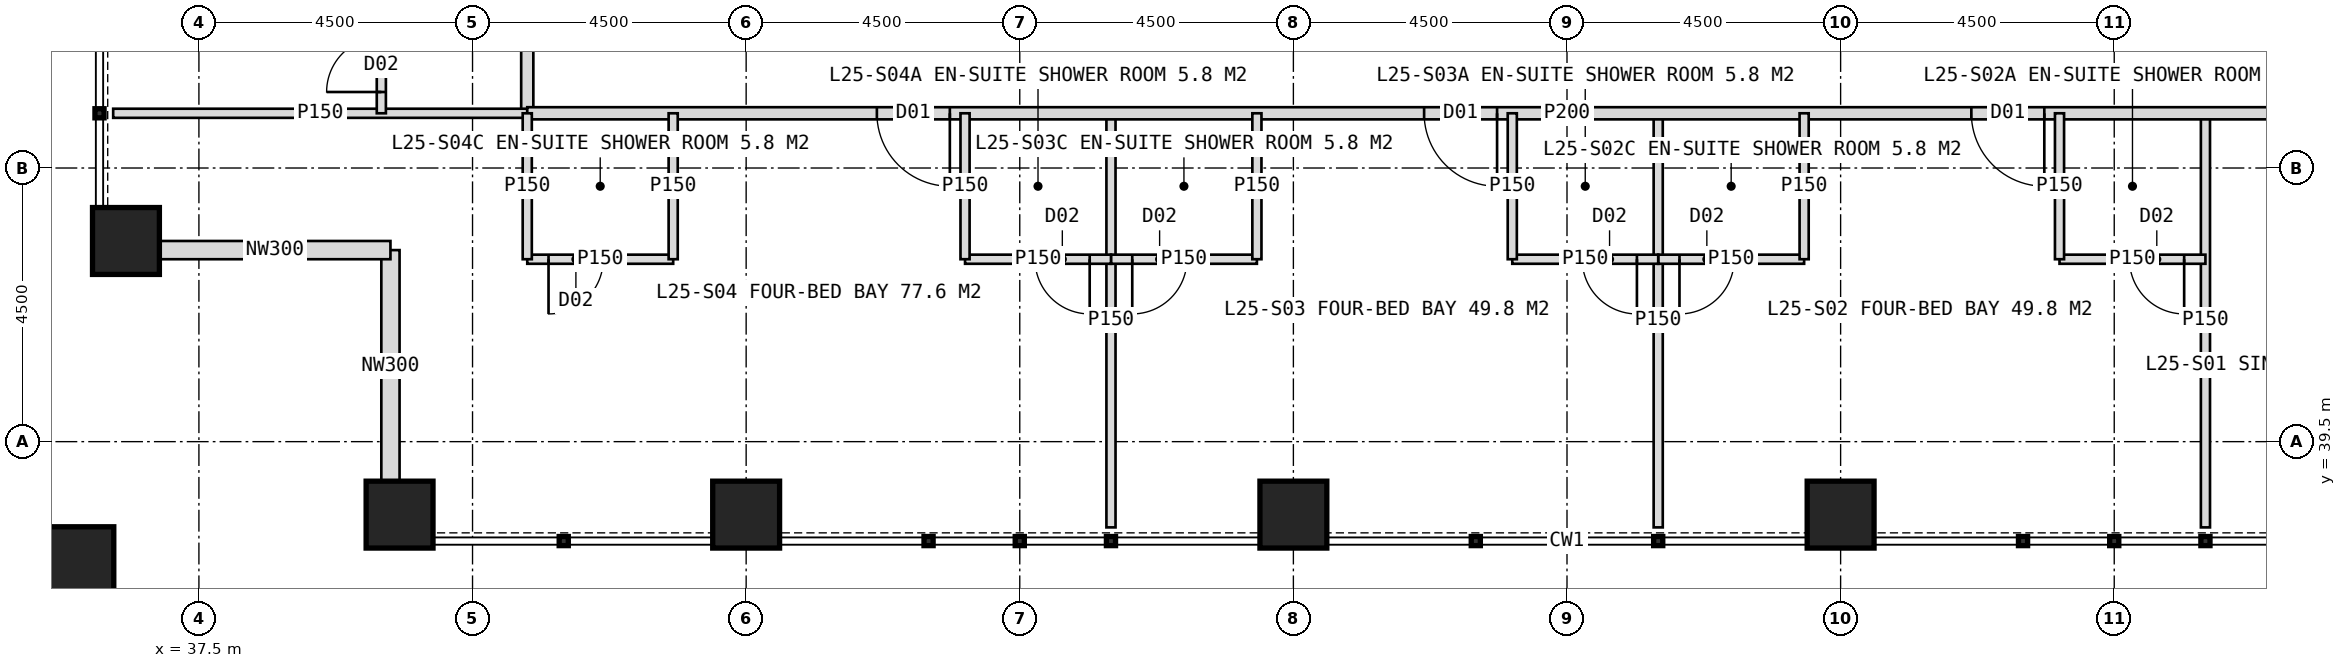
"""IFC4 building model, lengths in metres.
Left out: names, types, materials, properties, quantities, classifications, styles, units other than length and angle.
Written with IfcOpenShell. Run it as: python <this file> out.ifc"""

import sys

from ifc_helpers import new_model, si_unit, direction, frame, frame_2d, origin, origin_2d, place, context, subcontext, project, spatial, rectangle, hollow_rectangle, extrude, element, fill, save


model = new_model("IFC4")
c1 = context("Model", 3, precision=1e-05, world=origin(), true_north=direction((0.0, 1.0)))
c2 = subcontext(c1, "Body", "Model", "MODEL_VIEW")
j1 = project(units=[si_unit("LENGTHUNIT", "METRE"), si_unit("PLANEANGLEUNIT", "RADIAN")], contexts=[c1])
p1 = place(None, origin())
s1 = spatial("IfcSite", under=j1, at=p1, CompositionType="ELEMENT")
p2 = place(p1, origin())
s2 = spatial("IfcBuilding", under=s1, at=p2, CompositionType="ELEMENT")
p3 = place(p2, frame((0.0, 0.0, 108.0)))
s3 = spatial("IfcBuildingStorey", under=s2, at=p3, CompositionType="ELEMENT", Elevation=108.0)
for number, where, z_axis, x_axis in (
    (1, (40.8, 38.3, 0.0), (0.0, 0.0, 1.0), (1.0, 0.0, 0.0)),
    (2, (36.3, 42.8, 0.0), (0.0, 0.0, 1.0), (1.0, 0.0, 0.0)),
    (3, (46.5, 38.3, 0.0), (0.0, 0.0, 1.0), (1.0, 0.0, 0.0)),
    (4, (55.5, 38.3, 0.0), (0.0, 0.0, 1.0), (1.0, 0.0, 0.0)),
    (5, (64.5, 38.3, 0.0), (0.0, 0.0, 1.0), (1.0, 0.0, 0.0)),
):
    element("IfcColumn", number, at=place(p3, frame(where, z_axis=z_axis, x_axis=x_axis)), inside=s3, PredefinedType="COLUMN", context=c2, shape_type="SweptSolid", body=[
        extrude(hollow_rectangle(XDim=1.1, YDim=1.1, WallThickness=0.1, at=origin_2d()), origin(), (0.0, 0.0, 1.0), 4.0),
    ])
p4 = place(p3, frame((35.4, 37.4, 0.0), z_axis=(0.0, 0.0, 1.0), x_axis=(1.0, 0.0, 0.0)))
e6 = element("IfcColumn", 6, at=p4, inside=s3, PredefinedType="COLUMN", context=c2, shape_type="SweptSolid", body=[
    extrude(hollow_rectangle(XDim=1.4, YDim=1.4, WallThickness=0.08, at=origin_2d()), origin(), (0.0, 0.0, 1.0), 4.0),
])
for number, where, z_axis, x_axis in (
    (7, (40.65, 38.85, 0.0), (0.0, 0.0, 1.0), (0.0, 1.0, 0.0)),
    (8, (40.65, 42.65, 0.0), (0.0, 0.0, 1.0), (-1.0, 0.0, 0.0)),
):
    element("IfcWall", number, at=place(p3, frame(where, z_axis=z_axis, x_axis=x_axis)), inside=s3, PredefinedType="ELEMENTEDWALL", context=c2, shape_type="SweptSolid", body=[
        extrude(rectangle(XDim=3.8, YDim=0.3, at=frame_2d((1.9, 0.0))), origin(), (0.0, 0.0, 1.0), 4.0),
    ])
p5 = place(p3, frame((42.9, 44.9, 0.0), z_axis=(0.0, 0.0, 1.0), x_axis=(0.0, 1.0, 0.0)))
e9 = element("IfcWall", 9, at=p5, inside=s3, PredefinedType="PARTITIONING", context=c2, shape_type="SweptSolid", body=[
    extrude(rectangle(XDim=34.2, YDim=0.2, at=frame_2d((17.1, 0.0))), origin(), (0.0, 0.0, 1.0), 3.75),
])
p6 = place(p5, frame((3.25, 0.0, 0.0)))
e10 = element("IfcOpeningElement", 10, at=p6, cuts=e9, PredefinedType="OPENING", context=c2, shape_type="SweptSolid", body=[
    extrude(rectangle(XDim=1.2, YDim=2.2, at=frame_2d((0.6, 1.1))), frame((0.0, 0.11, 0.0), z_axis=(0.0, -1.0, 0.0), x_axis=(1.0, 0.0, 0.0)), (0.0, 0.0, 1.0), 0.22),
])
p7 = place(p5, frame((10.75, 0.0, 0.0)))
e11 = element("IfcOpeningElement", 11, at=p7, cuts=e9, PredefinedType="OPENING", context=c2, shape_type="SweptSolid", body=[
    extrude(rectangle(XDim=1.2, YDim=2.2, at=frame_2d((0.6, 1.1))), frame((0.0, 0.11, 0.0), z_axis=(0.0, -1.0, 0.0), x_axis=(1.0, 0.0, 0.0)), (0.0, 0.0, 1.0), 0.22),
])
p8 = place(p5, frame((19.75, 0.0, 0.0)))
e12 = element("IfcOpeningElement", 12, at=p8, cuts=e9, PredefinedType="OPENING", context=c2, shape_type="SweptSolid", body=[
    extrude(rectangle(XDim=1.2, YDim=2.2, at=frame_2d((0.6, 1.1))), frame((0.0, 0.11, 0.0), z_axis=(0.0, -1.0, 0.0), x_axis=(1.0, 0.0, 0.0)), (0.0, 0.0, 1.0), 0.22),
])
p9 = place(p5, frame((28.75, 0.0, 0.0)))
e13 = element("IfcOpeningElement", 13, at=p9, cuts=e9, PredefinedType="OPENING", context=c2, shape_type="SweptSolid", body=[
    extrude(rectangle(XDim=1.2, YDim=2.2, at=frame_2d((0.6, 1.1))), frame((0.0, 0.11, 0.0), z_axis=(0.0, -1.0, 0.0), x_axis=(1.0, 0.0, 0.0)), (0.0, 0.0, 1.0), 0.22),
])
p10 = place(p3, frame((42.9, 44.9, 0.0), z_axis=(0.0, 0.0, 1.0), x_axis=(-1.0, 0.0, 0.0)))
e14 = element("IfcWall", 14, at=p10, inside=s3, PredefinedType="PARTITIONING", context=c2, shape_type="SweptSolid", body=[
    extrude(rectangle(XDim=6.81, YDim=0.15, at=frame_2d((3.405, 0.0))), origin(), (0.0, 0.0, 1.0), 3.75),
])
p11 = place(p3, frame((40.5, 44.9, 0.0), z_axis=(0.0, 0.0, 1.0), x_axis=(0.0, 1.0, 0.0)))
e15 = element("IfcWall", 15, at=p11, inside=s3, PredefinedType="PARTITIONING", context=c2, shape_type="SweptSolid", body=[
    extrude(rectangle(XDim=3.0, YDim=0.15, at=frame_2d((1.5, 0.0))), origin(), (0.0, 0.0, 1.0), 3.75),
])
p12 = place(p11, frame((0.35, 0.0, 0.0)))
e16 = element("IfcOpeningElement", 16, at=p12, cuts=e15, PredefinedType="OPENING", context=c2, shape_type="SweptSolid", body=[
    extrude(rectangle(XDim=0.9, YDim=2.1, at=frame_2d((0.45, 1.05))), frame((0.0, 0.085, 0.0), z_axis=(0.0, -1.0, 0.0), x_axis=(1.0, 0.0, 0.0)), (0.0, 0.0, 1.0), 0.17),
])
for number, where, z_axis, x_axis in (
    (17, (70.5, 44.9, 0.0), (0.0, 0.0, 1.0), (0.0, -1.0, 0.0)),
    (18, (61.5, 44.9, 0.0), (0.0, 0.0, 1.0), (0.0, -1.0, 0.0)),
    (19, (52.5, 44.9, 0.0), (0.0, 0.0, 1.0), (0.0, -1.0, 0.0)),
):
    element("IfcWall", number, at=place(p3, frame(where, z_axis=z_axis, x_axis=x_axis)), inside=s3, PredefinedType="PARTITIONING", context=c2, shape_type="SweptSolid", body=[
        extrude(rectangle(XDim=6.81, YDim=0.15, at=frame_2d((3.405, 0.0))), origin(), (0.0, 0.0, 1.0), 3.75),
    ])
p13 = place(p3, frame((77.1, 44.9, 0.0), z_axis=(0.0, 0.0, 1.0), x_axis=(-1.0, 0.0, 0.0)))
e20 = element("IfcWall", 20, at=p13, inside=s3, PredefinedType="PARTITIONING", context=c2, shape_type="SweptSolid", body=[
    extrude(rectangle(XDim=34.2, YDim=0.2, at=frame_2d((17.1, 0.0))), origin(), (0.0, 0.0, 1.0), 3.75),
])
p14 = place(p13, frame((3.25, 0.0, 0.0)))
e21 = element("IfcOpeningElement", 21, at=p14, cuts=e20, PredefinedType="OPENING", context=c2, shape_type="SweptSolid", body=[
    extrude(rectangle(XDim=1.2, YDim=2.2, at=frame_2d((0.6, 1.1))), frame((0.0, 0.11, 0.0), z_axis=(0.0, -1.0, 0.0), x_axis=(1.0, 0.0, 0.0)), (0.0, 0.0, 1.0), 0.22),
])
p15 = place(p13, frame((9.25, 0.0, 0.0)))
e22 = element("IfcOpeningElement", 22, at=p15, cuts=e20, PredefinedType="OPENING", context=c2, shape_type="SweptSolid", body=[
    extrude(rectangle(XDim=1.2, YDim=2.2, at=frame_2d((0.6, 1.1))), frame((0.0, 0.11, 0.0), z_axis=(0.0, -1.0, 0.0), x_axis=(1.0, 0.0, 0.0)), (0.0, 0.0, 1.0), 0.22),
])
p16 = place(p13, frame((18.25, 0.0, 0.0)))
e23 = element("IfcOpeningElement", 23, at=p16, cuts=e20, PredefinedType="OPENING", context=c2, shape_type="SweptSolid", body=[
    extrude(rectangle(XDim=1.2, YDim=2.2, at=frame_2d((0.6, 1.1))), frame((0.0, 0.11, 0.0), z_axis=(0.0, -1.0, 0.0), x_axis=(1.0, 0.0, 0.0)), (0.0, 0.0, 1.0), 0.22),
])
p17 = place(p13, frame((27.25, 0.0, 0.0)))
e24 = element("IfcOpeningElement", 24, at=p17, cuts=e20, PredefinedType="OPENING", context=c2, shape_type="SweptSolid", body=[
    extrude(rectangle(XDim=1.2, YDim=2.2, at=frame_2d((0.6, 1.1))), frame((0.0, 0.11, 0.0), z_axis=(0.0, -1.0, 0.0), x_axis=(1.0, 0.0, 0.0)), (0.0, 0.0, 1.0), 0.22),
])
p18 = place(p3, frame((70.5, 42.5, 0.0), z_axis=(0.0, 0.0, 1.0), x_axis=(-1.0, 0.0, 0.0)))
e25 = element("IfcWall", 25, at=p18, inside=s3, PredefinedType="PARTITIONING", context=c2, shape_type="SweptSolid", body=[
    extrude(rectangle(XDim=2.4, YDim=0.15, at=frame_2d((1.2, 0.0))), origin(), (0.0, 0.0, 1.0), 3.75),
])
p19 = place(p18, frame((0.35, 0.0, 0.0)))
e26 = element("IfcOpeningElement", 26, at=p19, cuts=e25, PredefinedType="OPENING", context=c2, shape_type="SweptSolid", body=[
    extrude(rectangle(XDim=0.9, YDim=2.1, at=frame_2d((0.45, 1.05))), frame((0.0, 0.085, 0.0), z_axis=(0.0, -1.0, 0.0), x_axis=(1.0, 0.0, 0.0)), (0.0, 0.0, 1.0), 0.17),
])
p20 = place(p3, frame((68.1, 44.9, 0.0), z_axis=(0.0, 0.0, 1.0), x_axis=(0.0, -1.0, 0.0)))
e27 = element("IfcWall", 27, at=p20, inside=s3, PredefinedType="PARTITIONING", context=c2, shape_type="SweptSolid", body=[
    extrude(rectangle(XDim=2.4, YDim=0.15, at=frame_2d((1.2, 0.0))), origin(), (0.0, 0.0, 1.0), 3.75),
])
p21 = place(p3, frame((63.9, 42.5, 0.0), z_axis=(0.0, 0.0, 1.0), x_axis=(-1.0, 0.0, 0.0)))
e28 = element("IfcWall", 28, at=p21, inside=s3, PredefinedType="PARTITIONING", context=c2, shape_type="SweptSolid", body=[
    extrude(rectangle(XDim=2.4, YDim=0.15, at=frame_2d((1.2, 0.0))), origin(), (0.0, 0.0, 1.0), 3.75),
])
p22 = place(p21, frame((1.15, 0.0, 0.0)))
e29 = element("IfcOpeningElement", 29, at=p22, cuts=e28, PredefinedType="OPENING", context=c2, shape_type="SweptSolid", body=[
    extrude(rectangle(XDim=0.9, YDim=2.1, at=frame_2d((0.45, 1.05))), frame((0.0, 0.085, 0.0), z_axis=(0.0, -1.0, 0.0), x_axis=(1.0, 0.0, 0.0)), (0.0, 0.0, 1.0), 0.17),
])
p23 = place(p3, frame((63.9, 44.9, 0.0), z_axis=(0.0, 0.0, 1.0), x_axis=(0.0, -1.0, 0.0)))
e30 = element("IfcWall", 30, at=p23, inside=s3, PredefinedType="PARTITIONING", context=c2, shape_type="SweptSolid", body=[
    extrude(rectangle(XDim=2.4, YDim=0.15, at=frame_2d((1.2, 0.0))), origin(), (0.0, 0.0, 1.0), 3.75),
])
p24 = place(p3, frame((61.5, 42.5, 0.0), z_axis=(0.0, 0.0, 1.0), x_axis=(-1.0, 0.0, 0.0)))
e31 = element("IfcWall", 31, at=p24, inside=s3, PredefinedType="PARTITIONING", context=c2, shape_type="SweptSolid", body=[
    extrude(rectangle(XDim=2.4, YDim=0.15, at=frame_2d((1.2, 0.0))), origin(), (0.0, 0.0, 1.0), 3.75),
])
p25 = place(p24, frame((0.35, 0.0, 0.0)))
e32 = element("IfcOpeningElement", 32, at=p25, cuts=e31, PredefinedType="OPENING", context=c2, shape_type="SweptSolid", body=[
    extrude(rectangle(XDim=0.9, YDim=2.1, at=frame_2d((0.45, 1.05))), frame((0.0, 0.085, 0.0), z_axis=(0.0, -1.0, 0.0), x_axis=(1.0, 0.0, 0.0)), (0.0, 0.0, 1.0), 0.17),
])
p26 = place(p3, frame((59.1, 44.9, 0.0), z_axis=(0.0, 0.0, 1.0), x_axis=(0.0, -1.0, 0.0)))
e33 = element("IfcWall", 33, at=p26, inside=s3, PredefinedType="PARTITIONING", context=c2, shape_type="SweptSolid", body=[
    extrude(rectangle(XDim=2.4, YDim=0.15, at=frame_2d((1.2, 0.0))), origin(), (0.0, 0.0, 1.0), 3.75),
])
p27 = place(p3, frame((54.9, 42.5, 0.0), z_axis=(0.0, 0.0, 1.0), x_axis=(-1.0, 0.0, 0.0)))
e34 = element("IfcWall", 34, at=p27, inside=s3, PredefinedType="PARTITIONING", context=c2, shape_type="SweptSolid", body=[
    extrude(rectangle(XDim=2.4, YDim=0.15, at=frame_2d((1.2, 0.0))), origin(), (0.0, 0.0, 1.0), 3.75),
])
p28 = place(p27, frame((1.15, 0.0, 0.0)))
e35 = element("IfcOpeningElement", 35, at=p28, cuts=e34, PredefinedType="OPENING", context=c2, shape_type="SweptSolid", body=[
    extrude(rectangle(XDim=0.9, YDim=2.1, at=frame_2d((0.45, 1.05))), frame((0.0, 0.085, 0.0), z_axis=(0.0, -1.0, 0.0), x_axis=(1.0, 0.0, 0.0)), (0.0, 0.0, 1.0), 0.17),
])
p29 = place(p3, frame((54.9, 44.9, 0.0), z_axis=(0.0, 0.0, 1.0), x_axis=(0.0, -1.0, 0.0)))
e36 = element("IfcWall", 36, at=p29, inside=s3, PredefinedType="PARTITIONING", context=c2, shape_type="SweptSolid", body=[
    extrude(rectangle(XDim=2.4, YDim=0.15, at=frame_2d((1.2, 0.0))), origin(), (0.0, 0.0, 1.0), 3.75),
])
p30 = place(p3, frame((52.5, 42.5, 0.0), z_axis=(0.0, 0.0, 1.0), x_axis=(-1.0, 0.0, 0.0)))
e37 = element("IfcWall", 37, at=p30, inside=s3, PredefinedType="PARTITIONING", context=c2, shape_type="SweptSolid", body=[
    extrude(rectangle(XDim=2.4, YDim=0.15, at=frame_2d((1.2, 0.0))), origin(), (0.0, 0.0, 1.0), 3.75),
])
p31 = place(p30, frame((0.35, 0.0, 0.0)))
e38 = element("IfcOpeningElement", 38, at=p31, cuts=e37, PredefinedType="OPENING", context=c2, shape_type="SweptSolid", body=[
    extrude(rectangle(XDim=0.9, YDim=2.1, at=frame_2d((0.45, 1.05))), frame((0.0, 0.085, 0.0), z_axis=(0.0, -1.0, 0.0), x_axis=(1.0, 0.0, 0.0)), (0.0, 0.0, 1.0), 0.17),
])
p32 = place(p3, frame((50.1, 44.9, 0.0), z_axis=(0.0, 0.0, 1.0), x_axis=(0.0, -1.0, 0.0)))
e39 = element("IfcWall", 39, at=p32, inside=s3, PredefinedType="PARTITIONING", context=c2, shape_type="SweptSolid", body=[
    extrude(rectangle(XDim=2.4, YDim=0.15, at=frame_2d((1.2, 0.0))), origin(), (0.0, 0.0, 1.0), 3.75),
])
p33 = place(p3, frame((45.3, 42.5, 0.0), z_axis=(0.0, 0.0, 1.0), x_axis=(-1.0, 0.0, 0.0)))
e40 = element("IfcWall", 40, at=p33, inside=s3, PredefinedType="PARTITIONING", context=c2, shape_type="SweptSolid", body=[
    extrude(rectangle(XDim=2.4, YDim=0.15, at=frame_2d((1.2, 0.0))), origin(), (0.0, 0.0, 1.0), 3.75),
])
p34 = place(p33, frame((1.15, 0.0, 0.0)))
e41 = element("IfcOpeningElement", 41, at=p34, cuts=e40, PredefinedType="OPENING", context=c2, shape_type="SweptSolid", body=[
    extrude(rectangle(XDim=0.9, YDim=2.1, at=frame_2d((0.45, 1.05))), frame((0.0, 0.085, 0.0), z_axis=(0.0, -1.0, 0.0), x_axis=(1.0, 0.0, 0.0)), (0.0, 0.0, 1.0), 0.17),
])
for number, where, z_axis, x_axis in (
    (42, (45.3, 44.9, 0.0), (0.0, 0.0, 1.0), (0.0, -1.0, 0.0)),
    (43, (42.9, 44.9, 0.0), (0.0, 0.0, 1.0), (0.0, -1.0, 0.0)),
):
    element("IfcWall", number, at=place(p3, frame(where, z_axis=z_axis, x_axis=x_axis)), inside=s3, PredefinedType="PARTITIONING", context=c2, shape_type="SweptSolid", body=[
        extrude(rectangle(XDim=2.4, YDim=0.15, at=frame_2d((1.2, 0.0))), origin(), (0.0, 0.0, 1.0), 3.75),
    ])
p35 = place(p12, origin())
e44 = element("IfcDoor", 44, at=p35, inside=s3, OperationType="SINGLE_SWING_LEFT", PredefinedType="DOOR", context=c2, shape_type="SweptSolid", body=[
    extrude(rectangle(XDim=0.9, YDim=2.1, at=frame_2d((0.45, 1.05))), frame((0.0, 0.025, 0.0), z_axis=(0.0, -1.0, 0.0), x_axis=(1.0, 0.0, 0.0)), (0.0, 0.0, 1.0), 0.05),
])
fill(e16, e44)
p36 = place(p15, origin())
e45 = element("IfcDoor", 45, at=p36, inside=s3, OperationType="SINGLE_SWING_LEFT", PredefinedType="DOOR", context=c2, shape_type="SweptSolid", body=[
    extrude(rectangle(XDim=1.2, YDim=2.2, at=frame_2d((0.6, 1.1))), frame((0.0, 0.025, 0.0), z_axis=(0.0, -1.0, 0.0), x_axis=(1.0, 0.0, 0.0)), (0.0, 0.0, 1.0), 0.05),
])
fill(e22, e45)
p37 = place(p19, origin())
e46 = element("IfcDoor", 46, at=p37, inside=s3, OperationType="SINGLE_SWING_LEFT", PredefinedType="DOOR", context=c2, shape_type="SweptSolid", body=[
    extrude(rectangle(XDim=0.9, YDim=2.1, at=frame_2d((0.45, 1.05))), frame((0.0, 0.025, 0.0), z_axis=(0.0, -1.0, 0.0), x_axis=(1.0, 0.0, 0.0)), (0.0, 0.0, 1.0), 0.05),
])
fill(e26, e46)
p38 = place(p22, origin())
e47 = element("IfcDoor", 47, at=p38, inside=s3, OperationType="SINGLE_SWING_RIGHT", PredefinedType="DOOR", context=c2, shape_type="SweptSolid", body=[
    extrude(rectangle(XDim=0.9, YDim=2.1, at=frame_2d((0.45, 1.05))), frame((0.0, 0.025, 0.0), z_axis=(0.0, -1.0, 0.0), x_axis=(1.0, 0.0, 0.0)), (0.0, 0.0, 1.0), 0.05),
])
fill(e29, e47)
p39 = place(p16, origin())
e48 = element("IfcDoor", 48, at=p39, inside=s3, OperationType="SINGLE_SWING_LEFT", PredefinedType="DOOR", context=c2, shape_type="SweptSolid", body=[
    extrude(rectangle(XDim=1.2, YDim=2.2, at=frame_2d((0.6, 1.1))), frame((0.0, 0.025, 0.0), z_axis=(0.0, -1.0, 0.0), x_axis=(1.0, 0.0, 0.0)), (0.0, 0.0, 1.0), 0.05),
])
fill(e23, e48)
p40 = place(p25, origin())
e49 = element("IfcDoor", 49, at=p40, inside=s3, OperationType="SINGLE_SWING_LEFT", PredefinedType="DOOR", context=c2, shape_type="SweptSolid", body=[
    extrude(rectangle(XDim=0.9, YDim=2.1, at=frame_2d((0.45, 1.05))), frame((0.0, 0.025, 0.0), z_axis=(0.0, -1.0, 0.0), x_axis=(1.0, 0.0, 0.0)), (0.0, 0.0, 1.0), 0.05),
])
fill(e32, e49)
p41 = place(p28, origin())
e50 = element("IfcDoor", 50, at=p41, inside=s3, OperationType="SINGLE_SWING_RIGHT", PredefinedType="DOOR", context=c2, shape_type="SweptSolid", body=[
    extrude(rectangle(XDim=0.9, YDim=2.1, at=frame_2d((0.45, 1.05))), frame((0.0, 0.025, 0.0), z_axis=(0.0, -1.0, 0.0), x_axis=(1.0, 0.0, 0.0)), (0.0, 0.0, 1.0), 0.05),
])
fill(e35, e50)
p42 = place(p17, origin())
e51 = element("IfcDoor", 51, at=p42, inside=s3, OperationType="SINGLE_SWING_LEFT", PredefinedType="DOOR", context=c2, shape_type="SweptSolid", body=[
    extrude(rectangle(XDim=1.2, YDim=2.2, at=frame_2d((0.6, 1.1))), frame((0.0, 0.025, 0.0), z_axis=(0.0, -1.0, 0.0), x_axis=(1.0, 0.0, 0.0)), (0.0, 0.0, 1.0), 0.05),
])
fill(e24, e51)
p43 = place(p31, origin())
e52 = element("IfcDoor", 52, at=p43, inside=s3, OperationType="SINGLE_SWING_LEFT", PredefinedType="DOOR", context=c2, shape_type="SweptSolid", body=[
    extrude(rectangle(XDim=0.9, YDim=2.1, at=frame_2d((0.45, 1.05))), frame((0.0, 0.025, 0.0), z_axis=(0.0, -1.0, 0.0), x_axis=(1.0, 0.0, 0.0)), (0.0, 0.0, 1.0), 0.05),
])
fill(e38, e52)
p44 = place(p34, origin())
e53 = element("IfcDoor", 53, at=p44, inside=s3, OperationType="SINGLE_SWING_RIGHT", PredefinedType="DOOR", context=c2, shape_type="SweptSolid", body=[
    extrude(rectangle(XDim=0.9, YDim=2.1, at=frame_2d((0.45, 1.05))), frame((0.0, 0.025, 0.0), z_axis=(0.0, -1.0, 0.0), x_axis=(1.0, 0.0, 0.0)), (0.0, 0.0, 1.0), 0.05),
])
fill(e41, e53)
save(model, sys.argv[1])
